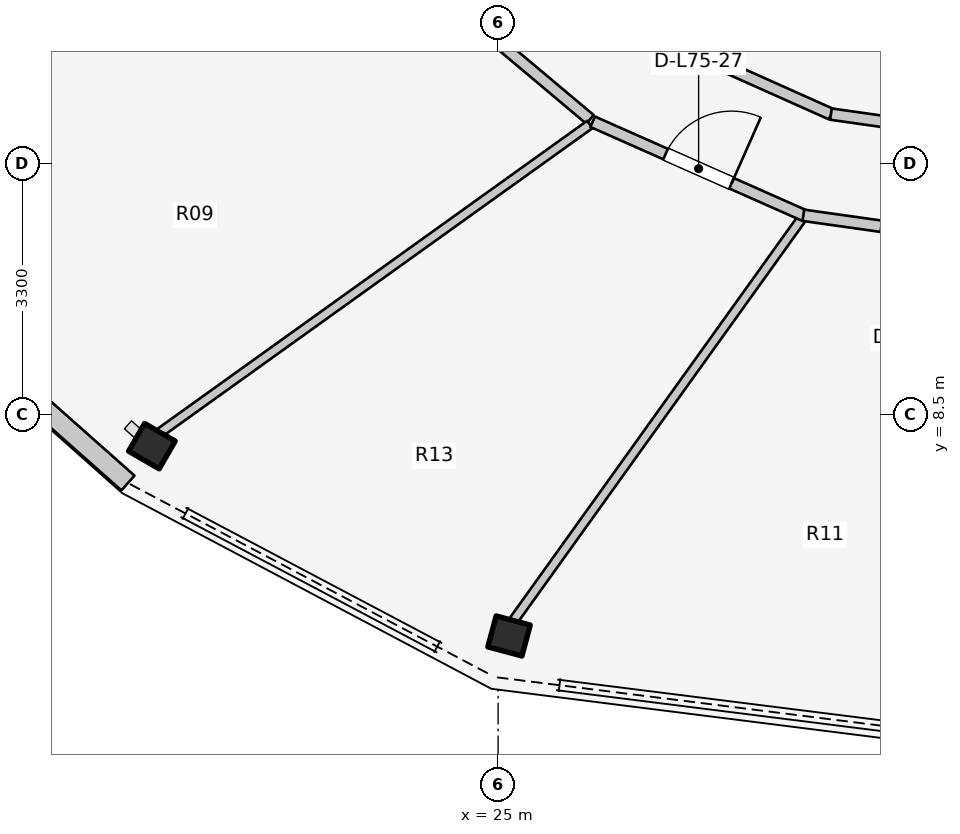
"""IFC4 building model, lengths in metres.
Left out: names, types, materials, properties, quantities, classifications, styles, units other than length and angle.
Written with IfcOpenShell. Run it as: python <this file> out.ifc"""

import sys

from ifc_helpers import new_model, si_unit, direction, frame, frame_2d, origin, origin_2d, place, context, subcontext, project, spatial, rectangle, i_section, extrude, element, fill, save


model = new_model("IFC4")
c1 = context("Model", 3, precision=1e-05, world=origin(), true_north=direction((0.0, 1.0)))
c2 = subcontext(c1, "Body", "Model", "MODEL_VIEW")
j1 = project(units=[si_unit("LENGTHUNIT", "METRE"), si_unit("PLANEANGLEUNIT", "RADIAN")], contexts=[c1])
p1 = place(None, origin())
s1 = spatial("IfcSite", under=j1, at=p1, CompositionType="ELEMENT")
p2 = place(p1, origin())
s2 = spatial("IfcBuilding", under=s1, at=p2, CompositionType="ELEMENT")
p3 = place(p2, frame((0.0, 0.0, 246.0)))
s3 = spatial("IfcBuildingStorey", under=s2, at=p3, CompositionType="ELEMENT", Elevation=246.0)
for number, where, z_axis, x_axis in (
    (1, (20.445, 8.086, 0.0), (0.0, 0.0, 1.0), (-0.5, -0.866, 0.0)),
    (2, (25.144, 5.589, 0.0), (0.0, 0.0, 1.0), (-0.259, -0.966, 0.0)),
):
    element("IfcColumn", number, at=place(p3, frame(where, z_axis=z_axis, x_axis=x_axis)), inside=s3, PredefinedType="COLUMN", context=c2, shape_type="SweptSolid", body=[
        extrude(i_section(OverallWidth=0.422, OverallDepth=0.465, WebThickness=0.045, FlangeThickness=0.073, FilletRadius=0.025, at=origin_2d()), origin(), (0.0, 0.0, 1.0), 3.6),
    ])
p4 = place(p3, frame((16.442, 10.871, 0.0), z_axis=(0.0, 0.0, 1.0), x_axis=(0.748165854006, -0.663511759428, 0.0)))
e3 = element("IfcWall", 3, at=p4, inside=s3, PredefinedType="STANDARD", context=c2, shape_type="SweptSolid", body=[
    extrude(rectangle(XDim=4.929, YDim=0.26, at=frame_2d((2.464, 0.0))), origin(), (0.0, 0.0, 1.0), 3.29),
])
p5 = place(p3, frame((26.935, 13.549, 0.0), z_axis=(0.0, 0.0, 1.0), x_axis=(0.912859324183, -0.408274239027, 0.0)))
e4 = element("IfcWall", 4, at=p5, inside=s3, PredefinedType="PARTITIONING", context=c2, shape_type="SweptSolid", body=[
    extrude(rectangle(XDim=2.682, YDim=0.15, at=frame_2d((1.341, 0.0))), origin(), (0.0, 0.0, 1.0), 2.816),
])
p6 = place(p3, frame((29.38, 12.455, 0.0), z_axis=(0.0, 0.0, 1.0), x_axis=(0.990096156252, -0.140390887794, 0.0)))
e5 = element("IfcWall", 5, at=p6, inside=s3, PredefinedType="PARTITIONING", context=c2, shape_type="SweptSolid", body=[
    extrude(rectangle(XDim=2.654, YDim=0.15, at=frame_2d((1.327, 0.0))), origin(), (0.0, 0.0, 1.0), 2.816),
])
p7 = place(p6, frame((0.852, 0.0, 0.0)))
e6 = element("IfcOpeningElement", 6, at=p7, cuts=e5, PredefinedType="OPENING", context=c2, shape_type="SweptSolid", body=[
    extrude(rectangle(XDim=0.95, YDim=2.1, at=frame_2d((0.475, 1.05))), frame((0.0, 0.085, 0.0), z_axis=(0.0, -1.0, 0.0), x_axis=(1.0, 0.0, 0.0)), (0.0, 0.0, 1.0), 0.17),
])
p8 = place(p3, frame((26.209, 12.385, 0.0), z_axis=(0.0, 0.0, 1.0), x_axis=(-0.765677451641, 0.643224719711, 0.0)))
e7 = element("IfcWall", 7, at=p8, inside=s3, PredefinedType="PARTITIONING", context=c2, shape_type="SweptSolid", body=[
    extrude(rectangle(XDim=2.105, YDim=0.15, at=frame_2d((1.053, 0.0))), origin(), (0.0, 0.0, 1.0), 2.816),
])
p9 = place(p3, frame((26.206, 12.318, 0.0), z_axis=(0.0, 0.0, 1.0), x_axis=(-0.812763742602, -0.582593424879, 0.0)))
e8 = element("IfcWall", 8, at=p9, inside=s3, PredefinedType="MOVABLE", context=c2, shape_type="SweptSolid", body=[
    extrude(rectangle(XDim=6.966, YDim=0.12, at=frame_2d((3.483, 0.0))), origin(), (0.0, 0.0, 1.0), 2.66),
])
p10 = place(p3, frame((28.992, 11.076, 0.0), z_axis=(0.0, 0.0, 1.0), x_axis=(-0.582726066442, -0.812668648029, 0.0)))
e9 = element("IfcWall", 9, at=p10, inside=s3, PredefinedType="MOVABLE", context=c2, shape_type="SweptSolid", body=[
    extrude(rectangle(XDim=6.515, YDim=0.12, at=frame_2d((3.257, 0.0))), origin(), (0.0, 0.0, 1.0), 2.66),
])
p11 = place(p3, frame((26.244, 12.354, 0.0), z_axis=(0.0, 0.0, 1.0), x_axis=(0.914302802833, -0.405031337963, 0.0)))
e10 = element("IfcWall", 10, at=p11, inside=s3, PredefinedType="PARTITIONING", context=c2, shape_type="SweptSolid", body=[
    extrude(rectangle(XDim=3.049, YDim=0.15, at=frame_2d((1.525, 0.0))), origin(), (0.0, 0.0, 1.0), 2.816),
])
p12 = place(p11, frame((1.05, 0.0, 0.0)))
e11 = element("IfcOpeningElement", 11, at=p12, cuts=e10, PredefinedType="OPENING", context=c2, shape_type="SweptSolid", body=[
    extrude(rectangle(XDim=0.95, YDim=2.1, at=frame_2d((0.475, 1.05))), frame((0.0, 0.085, 0.0), z_axis=(0.0, -1.0, 0.0), x_axis=(1.0, 0.0, 0.0)), (0.0, 0.0, 1.0), 0.17),
])
p13 = place(p3, frame((29.016, 11.123, 0.0), z_axis=(0.0, 0.0, 1.0), x_axis=(0.990225561979, -0.139475217886, 0.0)))
e12 = element("IfcWall", 12, at=p13, inside=s3, PredefinedType="PARTITIONING", context=c2, shape_type="SweptSolid", body=[
    extrude(rectangle(XDim=3.021, YDim=0.15, at=frame_2d((1.511, 0.0))), origin(), (0.0, 0.0, 1.0), 2.816),
])
p14 = place(p13, frame((1.036, 0.0, 0.0)))
e13 = element("IfcOpeningElement", 13, at=p14, cuts=e12, PredefinedType="OPENING", context=c2, shape_type="SweptSolid", body=[
    extrude(rectangle(XDim=0.95, YDim=2.1, at=frame_2d((0.475, 1.05))), frame((0.0, 0.085, 0.0), z_axis=(0.0, -1.0, 0.0), x_axis=(1.0, 0.0, 0.0)), (0.0, 0.0, 1.0), 0.17),
])
p15 = place(p12, origin())
e14 = element("IfcDoor", 14, at=p15, inside=s3, OperationType="SINGLE_SWING_RIGHT", PredefinedType="DOOR", context=c2, shape_type="SweptSolid", body=[
    extrude(rectangle(XDim=0.95, YDim=2.1, at=frame_2d((0.475, 1.05))), frame((0.0, 0.025, 0.0), z_axis=(0.0, -1.0, 0.0), x_axis=(1.0, 0.0, 0.0)), (0.0, 0.0, 1.0), 0.05),
])
fill(e11, e14)
save(model, sys.argv[1])
